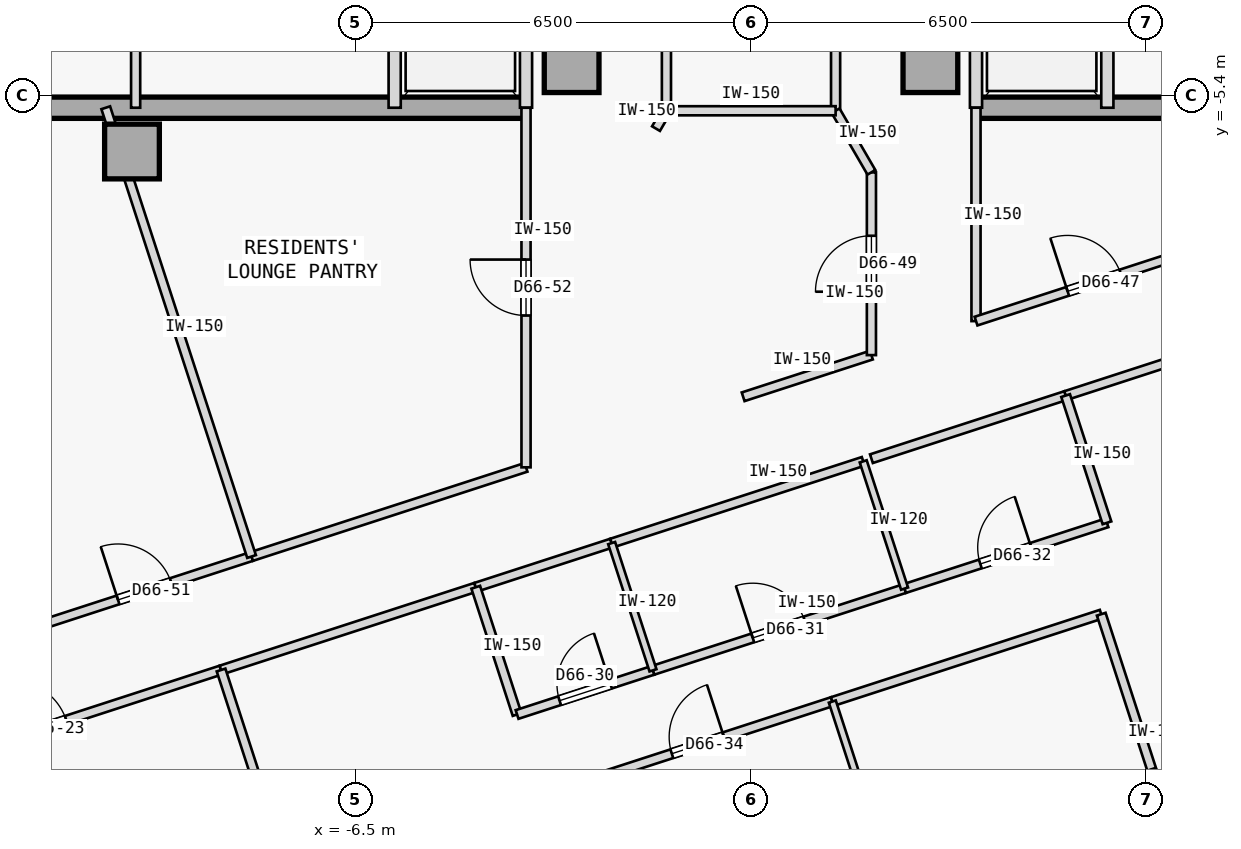
"""IFC4 building model, lengths in metres.
Left out: names, types, materials, properties, quantities, classifications, styles, units other than length and angle.
Written with IfcOpenShell. Run it as: python <this file> out.ifc"""

import sys

from ifc_helpers import new_model, si_unit, direction, frame, frame_2d, origin, origin_2d, place, context, subcontext, project, spatial, rectangle, extrude, element, fill, save


model = new_model("IFC4")
c1 = context("Model", 3, precision=1e-05, world=origin(), true_north=direction((0.0, 1.0)))
c2 = subcontext(c1, "Body", "Model", "MODEL_VIEW")
j1 = project(units=[si_unit("LENGTHUNIT", "METRE"), si_unit("PLANEANGLEUNIT", "RADIAN")], contexts=[c1])
p1 = place(None, origin())
s1 = spatial("IfcSite", under=j1, at=p1, CompositionType="ELEMENT")
p2 = place(p1, origin())
s2 = spatial("IfcBuilding", under=s1, at=p2, CompositionType="ELEMENT")
p3 = place(p2, frame((0.0, 0.0, 247.75)))
s3 = spatial("IfcBuildingStorey", under=s2, at=p3, CompositionType="ELEMENT", Elevation=247.75)
for number, where, z_axis, x_axis in (
    (1, (-10.18, -6.32, 0.0), (0.0, 0.0, 1.0), (1.0, 0.0, 0.0)),
    (2, (-2.95, -4.9, 0.0), (0.0, 0.0, 1.0), (1.0, 0.0, 0.0)),
    (3, (2.95, -4.9, 0.0), (0.0, 0.0, 1.0), (1.0, 0.0, 0.0)),
):
    element("IfcColumn", number, at=place(p3, frame(where, z_axis=z_axis, x_axis=x_axis)), inside=s3, PredefinedType="COLUMN", context=c2, shape_type="SweptSolid", body=[
        extrude(rectangle(XDim=0.9, YDim=0.9, at=origin_2d()), origin(), (0.0, 0.0, 1.0), 3.35),
    ])
for number, where, z_axis, x_axis in (
    (4, (-14.56, -5.6, 0.0), (0.0, 0.0, 1.0), (1.0, 0.0, 0.0)),
    (5, (3.7, -5.6, 0.0), (0.0, 0.0, 1.0), (1.0, 0.0, 0.0)),
):
    element("IfcWall", number, at=place(p3, frame(where, z_axis=z_axis, x_axis=x_axis)), inside=s3, PredefinedType="SHEAR", context=c2, shape_type="SweptSolid", body=[
        extrude(rectangle(XDim=10.86, YDim=0.35, at=frame_2d((5.43, 0.0))), origin(), (0.0, 0.0, 1.0), 3.125),
    ])
for number, where, z_axis, x_axis in (
    (6, (-3.7, -5.6, 0.0), (0.0, 0.0, 1.0), (0.0, 1.0, 0.0)),
    (7, (-5.86, -5.6, 0.0), (0.0, 0.0, 1.0), (0.0, 1.0, 0.0)),
    (8, (3.7, -5.6, 0.0), (0.0, 0.0, 1.0), (0.0, 1.0, 0.0)),
    (9, (5.86, -5.6, 0.0), (0.0, 0.0, 1.0), (0.0, 1.0, 0.0)),
):
    element("IfcWall", number, at=place(p3, frame(where, z_axis=z_axis, x_axis=x_axis)), inside=s3, PredefinedType="STANDARD", context=c2, shape_type="SweptSolid", body=[
        extrude(rectangle(XDim=2.65, YDim=0.2, at=frame_2d((1.325, 0.0))), origin(), (0.0, 0.0, 1.0), 3.125),
    ])
p4 = place(p3, frame((-10.12, -5.6, 0.0), z_axis=(0.0, 0.0, 1.0), x_axis=(0.0, 1.0, 0.0)))
e10 = element("IfcWall", 10, at=p4, inside=s3, PredefinedType="PARTITIONING", context=c2, shape_type="SweptSolid", body=[
    extrude(rectangle(XDim=2.65, YDim=0.15, at=frame_2d((1.325, 0.0))), origin(), (0.0, 0.0, 1.0), 3.125),
])
p5 = place(p3, frame((-1.391, -5.65, 0.0), z_axis=(0.0, 0.0, 1.0), x_axis=(-8.6422954e-05, 0.999999996266, 0.0)))
e11 = element("IfcWall", 11, at=p5, inside=s3, PredefinedType="PARTITIONING", context=c2, shape_type="SweptSolid", body=[
    extrude(rectangle(XDim=11.3, YDim=0.15, at=frame_2d((5.65, 0.0))), origin(), (0.0, 0.0, 1.0), 3.125),
])
p6 = place(p5, frame((5.175, 0.0, 0.0)))
e12 = element("IfcOpeningElement", 12, at=p6, cuts=e11, PredefinedType="OPENING", context=c2, shape_type="SweptSolid", body=[
    extrude(rectangle(XDim=0.95, YDim=2.15, at=frame_2d((0.475, 1.075))), frame((0.0, 0.085, 0.0), z_axis=(0.0, -1.0, 0.0), x_axis=(1.0, 0.0, 0.0)), (0.0, 0.0, 1.0), 0.17),
])
p7 = place(p3, frame((1.391, -5.648, 0.0), z_axis=(0.0, 0.0, 1.0), x_axis=(-4.3218947e-05, 0.999999999066, 0.0)))
e13 = element("IfcWall", 13, at=p7, inside=s3, PredefinedType="PARTITIONING", context=c2, shape_type="SweptSolid", body=[
    extrude(rectangle(XDim=11.298, YDim=0.15, at=frame_2d((5.649, 0.0))), origin(), (0.0, 0.0, 1.0), 3.125),
])
p8 = place(p3, frame((-14.709, -16.794, 0.0), z_axis=(0.0, 0.0, 1.0), x_axis=(0.951050295235, 0.309036140172, 0.0)))
e14 = element("IfcWall", 14, at=p8, inside=s3, PredefinedType="PARTITIONING", context=c2, shape_type="SweptSolid", body=[
    extrude(rectangle(XDim=6.302, YDim=0.15, at=frame_2d((3.151, 0.0))), origin(), (0.0, 0.0, 1.0), 3.125),
])
p9 = place(p8, frame((2.676, 0.0, 0.0)))
e15 = element("IfcOpeningElement", 15, at=p9, cuts=e14, PredefinedType="OPENING", context=c2, shape_type="SweptSolid", body=[
    extrude(rectangle(XDim=0.95, YDim=2.15, at=frame_2d((0.475, 1.075))), frame((0.0, 0.085, 0.0), z_axis=(0.0, -1.0, 0.0), x_axis=(1.0, 0.0, 0.0)), (0.0, 0.0, 1.0), 0.17),
])
p10 = place(p3, frame((-8.715, -14.847, 0.0), z_axis=(0.0, 0.0, 1.0), x_axis=(0.951061767293, 0.309000832997, 0.0)))
e16 = element("IfcWall", 16, at=p10, inside=s3, PredefinedType="PARTITIONING", context=c2, shape_type="SweptSolid", body=[
    extrude(rectangle(XDim=4.404, YDim=0.15, at=frame_2d((2.202, 0.0))), origin(), (0.0, 0.0, 1.0), 3.125),
])
p11 = place(p3, frame((5.174, -10.334, 0.0), z_axis=(0.0, 0.0, 1.0), x_axis=(0.951058579685, 0.30901064384, 0.0)))
e17 = element("IfcWall", 17, at=p11, inside=s3, PredefinedType="PARTITIONING", context=c2, shape_type="SweptSolid", body=[
    extrude(rectangle(XDim=5.416, YDim=0.15, at=frame_2d((2.708, 0.0))), origin(), (0.0, 0.0, 1.0), 3.125),
])
p12 = place(p11, frame((2.233, 0.0, 0.0)))
e18 = element("IfcOpeningElement", 18, at=p12, cuts=e17, PredefinedType="OPENING", context=c2, shape_type="SweptSolid", body=[
    extrude(rectangle(XDim=0.95, YDim=2.15, at=frame_2d((0.475, 1.075))), frame((0.0, 0.085, 0.0), z_axis=(0.0, -1.0, 0.0), x_axis=(1.0, 0.0, 0.0)), (0.0, 0.0, 1.0), 0.17),
])
p13 = place(p3, frame((-4.527, -13.486, 0.0), z_axis=(0.0, 0.0, 1.0), x_axis=(0.951045519245, 0.309050837767, 0.0)))
e19 = element("IfcWall", 19, at=p13, inside=s3, PredefinedType="PARTITIONING", context=c2, shape_type="SweptSolid", body=[
    extrude(rectangle(XDim=2.35, YDim=0.15, at=frame_2d((1.175, 0.0))), origin(), (0.0, 0.0, 1.0), 3.125),
])
p14 = place(p3, frame((-2.292, -12.76, 0.0), z_axis=(0.0, 0.0, 1.0), x_axis=(0.951052627573, 0.309028962374, 0.0)))
e20 = element("IfcWall", 20, at=p14, inside=s3, PredefinedType="PARTITIONING", context=c2, shape_type="SweptSolid", body=[
    extrude(rectangle(XDim=4.35, YDim=0.15, at=frame_2d((2.175, 0.0))), origin(), (0.0, 0.0, 1.0), 3.125),
])
p15 = place(p3, frame((1.98, -11.372, 0.0), z_axis=(0.0, 0.0, 1.0), x_axis=(0.951047958247, 0.309043332098, 0.0)))
e21 = element("IfcWall", 21, at=p15, inside=s3, PredefinedType="PARTITIONING", context=c2, shape_type="SweptSolid", body=[
    extrude(rectangle(XDim=3.358, YDim=0.15, at=frame_2d((1.679, 0.0))), origin(), (0.0, 0.0, 1.0), 3.125),
])
p16 = place(p3, frame((3.7, -9.109, 0.0), z_axis=(0.0, 0.0, 1.0), x_axis=(-0.000139130433, 0.999999990321, 0.0)))
e22 = element("IfcWall", 22, at=p16, inside=s3, PredefinedType="PARTITIONING", context=c2, shape_type="SweptSolid", body=[
    extrude(rectangle(XDim=3.51, YDim=0.15, at=frame_2d((1.755, 0.0))), origin(), (0.0, 0.0, 1.0), 3.125),
])
p17 = place(p3, frame((3.7, -9.109, 0.0), z_axis=(0.0, 0.0, 1.0), x_axis=(0.95106259184, 0.308998295145, 0.0)))
e23 = element("IfcWall", 23, at=p17, inside=s3, PredefinedType="PARTITIONING", context=c2, shape_type="SweptSolid", body=[
    extrude(rectangle(XDim=4.088, YDim=0.15, at=frame_2d((2.044, 0.0))), origin(), (0.0, 0.0, 1.0), 3.125),
])
p18 = place(p17, frame((1.584, 0.0, 0.0)))
e24 = element("IfcOpeningElement", 24, at=p18, cuts=e23, PredefinedType="OPENING", context=c2, shape_type="SweptSolid", body=[
    extrude(rectangle(XDim=0.92, YDim=2.15, at=frame_2d((0.46, 1.075))), frame((0.0, 0.085, 0.0), z_axis=(0.0, -1.0, 0.0), x_axis=(1.0, 0.0, 0.0)), (0.0, 0.0, 1.0), 0.17),
])
p19 = place(p3, frame((-0.129, -10.354, 0.0), z_axis=(0.0, 0.0, 1.0), x_axis=(0.951066420845, 0.308986509643, 0.0)))
e25 = element("IfcWall", 25, at=p19, inside=s3, PredefinedType="PARTITIONING", context=c2, shape_type="SweptSolid", body=[
    extrude(rectangle(XDim=2.218, YDim=0.15, at=frame_2d((1.109, 0.0))), origin(), (0.0, 0.0, 1.0), 3.125),
])
p20 = place(p3, frame((-1.562, -5.944, 0.0), z_axis=(0.0, 0.0, 1.0), x_axis=(0.505387839696, 0.862892305845, 0.0)))
e26 = element("IfcWall", 26, at=p20, inside=s3, PredefinedType="PARTITIONING", context=c2, shape_type="SweptSolid", body=[
    extrude(rectangle(XDim=0.34, YDim=0.15, at=frame_2d((0.17, 0.0))), origin(), (0.0, 0.0, 1.0), 3.125),
])
p21 = place(p3, frame((1.98, -9.668, 0.0), z_axis=(0.0, 0.0, 1.0), x_axis=(8.1241368e-05, 0.9999999967, 0.0)))
e27 = element("IfcWall", 27, at=p21, inside=s3, PredefinedType="PARTITIONING", context=c2, shape_type="SweptSolid", body=[
    extrude(rectangle(XDim=3.005, YDim=0.15, at=frame_2d((1.502, 0.0))), origin(), (0.0, 0.0, 1.0), 3.125),
])
p22 = place(p21, frame((1.042, 0.0, 0.0)))
e28 = element("IfcOpeningElement", 28, at=p22, cuts=e27, PredefinedType="OPENING", context=c2, shape_type="SweptSolid", body=[
    extrude(rectangle(XDim=0.92, YDim=2.15, at=frame_2d((0.46, 1.075))), frame((0.0, 0.085, 0.0), z_axis=(0.0, -1.0, 0.0), x_axis=(1.0, 0.0, 0.0)), (0.0, 0.0, 1.0), 0.17),
])
p23 = place(p3, frame((1.391, -5.649, 0.0), z_axis=(0.0, 0.0, 1.0), x_axis=(0.502522642426, -0.864564048437, 0.0)))
e29 = element("IfcWall", 29, at=p23, inside=s3, PredefinedType="PARTITIONING", context=c2, shape_type="SweptSolid", body=[
    extrude(rectangle(XDim=1.171, YDim=0.15, at=frame_2d((0.586, 0.0))), origin(), (0.0, 0.0, 1.0), 3.125),
])
p24 = place(p3, frame((-11.73, -14.123, 0.0), z_axis=(0.0, 0.0, 1.0), x_axis=(0.951052502763, 0.309029346483, 0.0)))
e30 = element("IfcWall", 30, at=p24, inside=s3, PredefinedType="PARTITIONING", context=c2, shape_type="SweptSolid", body=[
    extrude(rectangle(XDim=3.698, YDim=0.15, at=frame_2d((1.849, 0.0))), origin(), (0.0, 0.0, 1.0), 3.125),
])
p25 = place(p24, frame((1.389, 0.0, 0.0)))
e31 = element("IfcOpeningElement", 31, at=p25, cuts=e30, PredefinedType="OPENING", context=c2, shape_type="SweptSolid", body=[
    extrude(rectangle(XDim=0.92, YDim=2.15, at=frame_2d((0.46, 1.075))), frame((0.0, 0.085, 0.0), z_axis=(0.0, -1.0, 0.0), x_axis=(1.0, 0.0, 0.0)), (0.0, 0.0, 1.0), 0.17),
])
p26 = place(p3, frame((-8.213, -12.98, 0.0), z_axis=(0.0, 0.0, 1.0), x_axis=(0.951058260096, 0.309011627456, 0.0)))
e32 = element("IfcWall", 32, at=p26, inside=s3, PredefinedType="PARTITIONING", context=c2, shape_type="SweptSolid", body=[
    extrude(rectangle(XDim=4.746, YDim=0.15, at=frame_2d((2.373, 0.0))), origin(), (0.0, 0.0, 1.0), 3.125),
])
p27 = place(p3, frame((-3.7, -11.514, 0.0), z_axis=(0.0, 0.0, 1.0), x_axis=(-8.2572974e-05, 0.999999996591, 0.0)))
e33 = element("IfcWall", 33, at=p27, inside=s3, PredefinedType="PARTITIONING", context=c2, shape_type="SweptSolid", body=[
    extrude(rectangle(XDim=5.913, YDim=0.15, at=frame_2d((2.957, 0.0))), origin(), (0.0, 0.0, 1.0), 3.125),
])
p28 = place(p27, frame((2.497, 0.0, 0.0)))
e34 = element("IfcOpeningElement", 34, at=p28, cuts=e33, PredefinedType="OPENING", context=c2, shape_type="SweptSolid", body=[
    extrude(rectangle(XDim=0.92, YDim=2.15, at=frame_2d((0.46, 1.075))), frame((0.0, 0.085, 0.0), z_axis=(0.0, -1.0, 0.0), x_axis=(1.0, 0.0, 0.0)), (0.0, 0.0, 1.0), 0.17),
])
p29 = place(p3, frame((-1.391, -5.65, 0.0), z_axis=(0.0, 0.0, 1.0), x_axis=(0.999999965344, 0.000263273356, 0.0)))
e35 = element("IfcWall", 35, at=p29, inside=s3, PredefinedType="PARTITIONING", context=c2, shape_type="SweptSolid", body=[
    extrude(rectangle(XDim=2.782, YDim=0.15, at=frame_2d((1.391, 0.0))), origin(), (0.0, 0.0, 1.0), 3.125),
])
p30 = place(p3, frame((-5.668, -24.226, 0.0), z_axis=(0.0, 0.0, 1.0), x_axis=(-0.309022258842, 0.95105480575, 0.0)))
e36 = element("IfcWall", 36, at=p30, inside=s3, PredefinedType="PARTITIONING", context=c2, shape_type="SweptSolid", body=[
    extrude(rectangle(XDim=9.862, YDim=0.15, at=frame_2d((4.931, 0.0))), origin(), (0.0, 0.0, 1.0), 3.125),
])
p31 = place(p3, frame((-3.847, -15.578, 0.0), z_axis=(0.0, 0.0, 1.0), x_axis=(-0.309060979314, 0.951042223598, 0.0)))
e37 = element("IfcWall", 37, at=p31, inside=s3, PredefinedType="PARTITIONING", context=c2, shape_type="SweptSolid", body=[
    extrude(rectangle(XDim=2.2, YDim=0.15, at=frame_2d((1.1, 0.0))), origin(), (0.0, 0.0, 1.0), 3.125),
])
p32 = place(p3, frame((-3.847, -15.578, 0.0), z_axis=(0.0, 0.0, 1.0), x_axis=(0.951035595692, 0.309081373955, 0.0)))
e38 = element("IfcWall", 38, at=p32, inside=s3, PredefinedType="PARTITIONING", context=c2, shape_type="SweptSolid", body=[
    extrude(rectangle(XDim=2.35, YDim=0.15, at=frame_2d((1.175, 0.0))), origin(), (0.0, 0.0, 1.0), 3.125),
])
p33 = place(p32, frame((0.735, 0.0, 0.0)))
e39 = element("IfcOpeningElement", 39, at=p33, cuts=e38, PredefinedType="OPENING", context=c2, shape_type="SweptSolid", body=[
    extrude(rectangle(XDim=0.88, YDim=2.15, at=frame_2d((0.44, 1.075))), frame((0.0, 0.085, 0.0), z_axis=(0.0, -1.0, 0.0), x_axis=(1.0, 0.0, 0.0)), (0.0, 0.0, 1.0), 0.17),
])
p34 = place(p3, frame((-1.612, -14.852, 0.0), z_axis=(0.0, 0.0, 1.0), x_axis=(0.951074479912, 0.30896170258, 0.0)))
e40 = element("IfcWall", 40, at=p34, inside=s3, PredefinedType="PARTITIONING", context=c2, shape_type="SweptSolid", body=[
    extrude(rectangle(XDim=4.35, YDim=0.15, at=frame_2d((2.175, 0.0))), origin(), (0.0, 0.0, 1.0), 3.125),
])
p35 = place(p34, frame((1.725, 0.0, 0.0)))
e41 = element("IfcOpeningElement", 41, at=p35, cuts=e40, PredefinedType="OPENING", context=c2, shape_type="SweptSolid", body=[
    extrude(rectangle(XDim=0.9, YDim=2.15, at=frame_2d((0.45, 1.075))), frame((0.0, 0.085, 0.0), z_axis=(0.0, -1.0, 0.0), x_axis=(1.0, 0.0, 0.0)), (0.0, 0.0, 1.0), 0.17),
])
p36 = place(p3, frame((2.525, -13.508, 0.0), z_axis=(0.0, 0.0, 1.0), x_axis=(0.95103509395, 0.3090829178, 0.0)))
e42 = element("IfcWall", 42, at=p36, inside=s3, PredefinedType="PARTITIONING", context=c2, shape_type="SweptSolid", body=[
    extrude(rectangle(XDim=3.5, YDim=0.15, at=frame_2d((1.75, 0.0))), origin(), (0.0, 0.0, 1.0), 3.125),
])
p37 = place(p36, frame((1.31, 0.0, 0.0)))
e43 = element("IfcOpeningElement", 43, at=p37, cuts=e42, PredefinedType="OPENING", context=c2, shape_type="SweptSolid", body=[
    extrude(rectangle(XDim=0.88, YDim=2.15, at=frame_2d((0.44, 1.075))), frame((0.0, 0.085, 0.0), z_axis=(0.0, -1.0, 0.0), x_axis=(1.0, 0.0, 0.0)), (0.0, 0.0, 1.0), 0.17),
])
p38 = place(p3, frame((5.854, -12.426, 0.0), z_axis=(0.0, 0.0, 1.0), x_axis=(-0.308960600764, 0.951074837842, 0.0)))
e44 = element("IfcWall", 44, at=p38, inside=s3, PredefinedType="PARTITIONING", context=c2, shape_type="SweptSolid", body=[
    extrude(rectangle(XDim=2.2, YDim=0.15, at=frame_2d((1.1, 0.0))), origin(), (0.0, 0.0, 1.0), 3.125),
])
p39 = place(p3, frame((-3.085, -16.803, 0.0), z_axis=(0.0, 0.0, 1.0), x_axis=(0.951050272606, 0.309036209813, 0.0)))
e45 = element("IfcWall", 45, at=p39, inside=s3, PredefinedType="PARTITIONING", context=c2, shape_type="SweptSolid", body=[
    extrude(rectangle(XDim=4.65, YDim=0.15, at=frame_2d((2.325, 0.0))), origin(), (0.0, 0.0, 1.0), 3.125),
])
p40 = place(p39, frame((1.875, 0.0, 0.0)))
e46 = element("IfcOpeningElement", 46, at=p40, cuts=e45, PredefinedType="OPENING", context=c2, shape_type="SweptSolid", body=[
    extrude(rectangle(XDim=0.9, YDim=2.15, at=frame_2d((0.45, 1.075))), frame((0.0, 0.085, 0.0), z_axis=(0.0, -1.0, 0.0), x_axis=(1.0, 0.0, 0.0)), (0.0, 0.0, 1.0), 0.17),
])
p41 = place(p3, frame((1.337, -15.366, 0.0), z_axis=(0.0, 0.0, 1.0), x_axis=(0.951050272606, 0.309036209813, 0.0)))
e47 = element("IfcWall", 47, at=p41, inside=s3, PredefinedType="PARTITIONING", context=c2, shape_type="SweptSolid", body=[
    extrude(rectangle(XDim=4.65, YDim=0.15, at=frame_2d((2.325, 0.0))), origin(), (0.0, 0.0, 1.0), 3.125),
])
p42 = place(p3, frame((7.695, -19.884, 0.0), z_axis=(0.0, 0.0, 1.0), x_axis=(-0.309013782848, 0.951057559777, 0.0)))
e48 = element("IfcWall", 48, at=p42, inside=s3, PredefinedType="PARTITIONING", context=c2, shape_type="SweptSolid", body=[
    extrude(rectangle(XDim=6.262, YDim=0.15, at=frame_2d((3.131, 0.0))), origin(), (0.0, 0.0, 1.0), 3.125),
])
p43 = place(p42, frame((2.681, 0.0, 0.0)))
e49 = element("IfcOpeningElement", 49, at=p43, cuts=e48, PredefinedType="OPENING", context=c2, shape_type="SweptSolid", body=[
    extrude(rectangle(XDim=0.9, YDim=2.15, at=frame_2d((0.45, 1.075))), frame((0.0, 0.085, 0.0), z_axis=(0.0, -1.0, 0.0), x_axis=(1.0, 0.0, 0.0)), (0.0, 0.0, 1.0), 0.17),
])
p44 = place(p3, frame((-1.612, -14.852, 0.0), z_axis=(0.0, 0.0, 1.0), x_axis=(-0.308960600764, 0.951074837842, 0.0)))
e50 = element("IfcWall", 50, at=p44, inside=s3, PredefinedType="PARTITIONING", context=c2, shape_type="SweptSolid", body=[
    extrude(rectangle(XDim=2.2, YDim=0.12, at=frame_2d((1.1, 0.0))), origin(), (0.0, 0.0, 1.0), 3.125),
])
p45 = place(p3, frame((2.525, -13.508, 0.0), z_axis=(0.0, 0.0, 1.0), x_axis=(-0.309028364152, 0.951052821956, 0.0)))
e51 = element("IfcWall", 51, at=p45, inside=s3, PredefinedType="PARTITIONING", context=c2, shape_type="SweptSolid", body=[
    extrude(rectangle(XDim=2.2, YDim=0.12, at=frame_2d((1.1, 0.0))), origin(), (0.0, 0.0, 1.0), 3.125),
])
p46 = place(p3, frame((3.272, -21.321, 0.0), z_axis=(0.0, 0.0, 1.0), x_axis=(-0.309013782848, 0.951057559777, 0.0)))
e52 = element("IfcWall", 52, at=p46, inside=s3, PredefinedType="PARTITIONING", context=c2, shape_type="SweptSolid", body=[
    extrude(rectangle(XDim=6.262, YDim=0.12, at=frame_2d((3.131, 0.0))), origin(), (0.0, 0.0, 1.0), 3.125),
])
p47 = place(p3, frame((-8.213, -12.98, 0.0), z_axis=(0.0, 0.0, 1.0), x_axis=(-0.309017065592, 0.951056493155, 0.0)))
e53 = element("IfcWall", 53, at=p47, inside=s3, PredefinedType="PARTITIONING", context=c2, shape_type="SweptSolid", body=[
    extrude(rectangle(XDim=7.76, YDim=0.15, at=frame_2d((3.88, 0.0))), origin(), (0.0, 0.0, 1.0), 3.125),
])
p48 = place(p9, origin())
e54 = element("IfcDoor", 54, at=p48, inside=s3, OperationType="SINGLE_SWING_LEFT", PredefinedType="DOOR", context=c2, shape_type="SweptSolid", body=[
    extrude(rectangle(XDim=0.95, YDim=2.15, at=frame_2d((0.475, 1.075))), frame((0.0, 0.025, 0.0), z_axis=(0.0, -1.0, 0.0), x_axis=(1.0, 0.0, 0.0)), (0.0, 0.0, 1.0), 0.05),
])
fill(e15, e54)
p49 = place(p33, origin())
e55 = element("IfcDoor", 55, at=p49, inside=s3, OperationType="SINGLE_SWING_RIGHT", PredefinedType="DOOR", context=c2, shape_type="SweptSolid", body=[
    extrude(rectangle(XDim=0.88, YDim=2.15, at=frame_2d((0.44, 1.075))), frame((0.0, 0.025, 0.0), z_axis=(0.0, -1.0, 0.0), x_axis=(1.0, 0.0, 0.0)), (0.0, 0.0, 1.0), 0.05),
])
fill(e39, e55)
p50 = place(p35, origin())
e56 = element("IfcDoor", 56, at=p50, inside=s3, OperationType="SINGLE_SWING_LEFT", PredefinedType="DOOR", context=c2, shape_type="SweptSolid", body=[
    extrude(rectangle(XDim=0.9, YDim=2.15, at=frame_2d((0.45, 1.075))), frame((0.0, 0.025, 0.0), z_axis=(0.0, -1.0, 0.0), x_axis=(1.0, 0.0, 0.0)), (0.0, 0.0, 1.0), 0.05),
])
fill(e41, e56)
p51 = place(p37, origin())
e57 = element("IfcDoor", 57, at=p51, inside=s3, OperationType="SINGLE_SWING_RIGHT", PredefinedType="DOOR", context=c2, shape_type="SweptSolid", body=[
    extrude(rectangle(XDim=0.88, YDim=2.15, at=frame_2d((0.44, 1.075))), frame((0.0, 0.025, 0.0), z_axis=(0.0, -1.0, 0.0), x_axis=(1.0, 0.0, 0.0)), (0.0, 0.0, 1.0), 0.05),
])
fill(e43, e57)
p52 = place(p40, origin())
e58 = element("IfcDoor", 58, at=p52, inside=s3, OperationType="SINGLE_SWING_RIGHT", PredefinedType="DOOR", context=c2, shape_type="SweptSolid", body=[
    extrude(rectangle(XDim=0.9, YDim=2.15, at=frame_2d((0.45, 1.075))), frame((0.0, 0.025, 0.0), z_axis=(0.0, -1.0, 0.0), x_axis=(1.0, 0.0, 0.0)), (0.0, 0.0, 1.0), 0.05),
])
fill(e46, e58)
p53 = place(p18, origin())
e59 = element("IfcDoor", 59, at=p53, inside=s3, OperationType="SINGLE_SWING_LEFT", PredefinedType="DOOR", context=c2, shape_type="SweptSolid", body=[
    extrude(rectangle(XDim=0.92, YDim=2.15, at=frame_2d((0.46, 1.075))), frame((0.0, 0.025, 0.0), z_axis=(0.0, -1.0, 0.0), x_axis=(1.0, 0.0, 0.0)), (0.0, 0.0, 1.0), 0.05),
])
fill(e24, e59)
p54 = place(p22, origin())
e60 = element("IfcDoor", 60, at=p54, inside=s3, OperationType="SINGLE_SWING_LEFT", PredefinedType="DOOR", context=c2, shape_type="SweptSolid", body=[
    extrude(rectangle(XDim=0.92, YDim=2.15, at=frame_2d((0.46, 1.075))), frame((0.0, 0.025, 0.0), z_axis=(0.0, -1.0, 0.0), x_axis=(1.0, 0.0, 0.0)), (0.0, 0.0, 1.0), 0.05),
])
fill(e28, e60)
p55 = place(p25, origin())
e61 = element("IfcDoor", 61, at=p55, inside=s3, OperationType="SINGLE_SWING_LEFT", PredefinedType="DOOR", context=c2, shape_type="SweptSolid", body=[
    extrude(rectangle(XDim=0.92, YDim=2.15, at=frame_2d((0.46, 1.075))), frame((0.0, 0.025, 0.0), z_axis=(0.0, -1.0, 0.0), x_axis=(1.0, 0.0, 0.0)), (0.0, 0.0, 1.0), 0.05),
])
fill(e31, e61)
p56 = place(p28, origin())
e62 = element("IfcDoor", 62, at=p56, inside=s3, OperationType="SINGLE_SWING_RIGHT", PredefinedType="DOOR", context=c2, shape_type="SweptSolid", body=[
    extrude(rectangle(XDim=0.92, YDim=2.15, at=frame_2d((0.46, 1.075))), frame((0.0, 0.025, 0.0), z_axis=(0.0, -1.0, 0.0), x_axis=(1.0, 0.0, 0.0)), (0.0, 0.0, 1.0), 0.05),
])
fill(e34, e62)
save(model, sys.argv[1])
